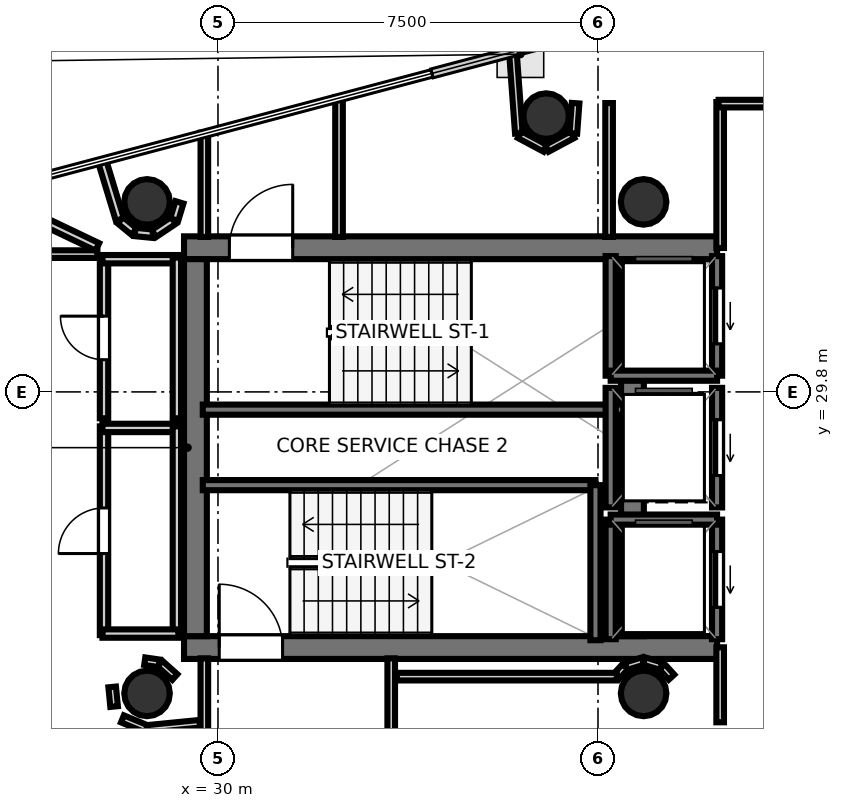
"""IFC4 building model, lengths in metres.
Left out: names, types, materials, properties, quantities, classifications, styles, units other than length and angle.
Written with IfcOpenShell. Run it as: python <this file> out.ifc"""

import sys

from ifc_helpers import new_model, si_unit, direction, frame, frame_2d, origin, origin_2d, place, context, subcontext, project, spatial, rectangle, hollow_circle, extrude, element, fill, save


model = new_model("IFC4")
c1 = context("Model", 3, precision=1e-05, world=origin(), true_north=direction((0.0, 1.0)))
c2 = subcontext(c1, "Body", "Model", "MODEL_VIEW")
j1 = project(units=[si_unit("LENGTHUNIT", "METRE"), si_unit("PLANEANGLEUNIT", "RADIAN")], contexts=[c1])
p1 = place(None, origin())
s1 = spatial("IfcSite", under=j1, at=p1, CompositionType="ELEMENT")
p2 = place(p1, origin())
s2 = spatial("IfcBuilding", under=s1, at=p2, CompositionType="ELEMENT")
p3 = place(p2, frame((0.0, 0.0, 313.9)))
s3 = spatial("IfcBuildingStorey", under=s2, at=p3, CompositionType="ELEMENT", Elevation=313.9)
p4 = place(p3, frame((29.33, 32.645, 0.0), z_axis=(0.0, 0.0, 1.0), x_axis=(1.0, 0.0, 0.0)))
e1 = element("IfcWall", 1, at=p4, inside=s3, PredefinedType="SHEAR", context=c2, shape_type="SweptSolid", body=[
    extrude(rectangle(XDim=10.52, YDim=0.45, at=frame_2d((5.26, 0.0))), origin(), (0.0, 0.0, 1.0), 3.52),
])
p5 = place(p4, frame((0.895, 0.0, 0.0)))
e2 = element("IfcOpeningElement", 2, at=p5, cuts=e1, PredefinedType="OPENING", context=c2, shape_type="SweptSolid", body=[
    extrude(rectangle(XDim=1.25, YDim=2.15, at=frame_2d((0.625, 1.075))), frame((0.0, 0.235, 0.0), z_axis=(0.0, -1.0, 0.0), x_axis=(1.0, 0.0, 0.0)), (0.0, 0.0, 1.0), 0.47),
])
p6 = place(p3, frame((29.33, 24.755, 0.0), z_axis=(0.0, 0.0, 1.0), x_axis=(1.0, 0.0, 0.0)))
e3 = element("IfcWall", 3, at=p6, inside=s3, PredefinedType="SHEAR", context=c2, shape_type="SweptSolid", body=[
    extrude(rectangle(XDim=10.52, YDim=0.45, at=frame_2d((5.26, 0.0))), origin(), (0.0, 0.0, 1.0), 3.52),
])
p7 = place(p6, frame((0.695, 0.0, 0.0)))
e4 = element("IfcOpeningElement", 4, at=p7, cuts=e3, PredefinedType="OPENING", context=c2, shape_type="SweptSolid", body=[
    extrude(rectangle(XDim=1.25, YDim=2.15, at=frame_2d((0.625, 1.075))), frame((0.0, 0.235, 0.0), z_axis=(0.0, -1.0, 0.0), x_axis=(1.0, 0.0, 0.0)), (0.0, 0.0, 1.0), 0.47),
])
for number, where, z_axis, x_axis in (
    (5, (29.555, 24.98, 0.0), (0.0, 0.0, 1.0), (0.0, 1.0, 0.0)),
    (6, (38.18, 24.98, 0.0), (0.0, 0.0, 1.0), (0.0, 1.0, 0.0)),
):
    element("IfcWall", number, at=place(p3, frame(where, z_axis=z_axis, x_axis=x_axis)), inside=s3, PredefinedType="SHEAR", context=c2, shape_type="SweptSolid", body=[
        extrude(rectangle(XDim=7.44, YDim=0.45, at=frame_2d((3.72, 0.0))), origin(), (0.0, 0.0, 1.0), 3.52),
    ])
for number, where, z_axis, x_axis in (
    (7, (28.6, 33.55, 0.0), (0.0, 0.0, 1.0), (1.0, 0.0, 0.0)),
    (8, (28.6, 23.85, 0.0), (0.0, 0.0, 1.0), (1.0, 0.0, 0.0)),
    (9, (38.4, 33.55, 0.0), (0.0, 0.0, 1.0), (1.0, 0.0, 0.0)),
    (10, (38.4, 23.85, 0.0), (0.0, 0.0, 1.0), (1.0, 0.0, 0.0)),
    (11, (36.476, 35.243, 0.0), (0.0, 0.0, 1.0), (1.0, 0.0, 0.0)),
):
    element("IfcColumn", number, at=place(p3, frame(where, z_axis=z_axis, x_axis=x_axis)), inside=s3, PredefinedType="COLUMN", context=c2, shape_type="SweptSolid", body=[
        extrude(hollow_circle(Radius=0.45, WallThickness=0.025, at=origin_2d()), origin(), (0.0, 0.0, 1.0), 3.7),
    ])
p8 = place(p3, frame((29.7, 29.45, 0.0), z_axis=(0.0, 0.0, 1.0), x_axis=(1.0, 0.0, 0.0)))
e12 = element("IfcWall", 12, at=p8, inside=s3, PredefinedType="SOLIDWALL", context=c2, shape_type="SweptSolid", body=[
    extrude(rectangle(XDim=8.3, YDim=0.2, at=frame_2d((4.15, 0.0))), origin(), (0.0, 0.0, 1.0), 3.52),
])
p9 = place(p3, frame((29.7, 27.96, 0.0), z_axis=(0.0, 0.0, 1.0), x_axis=(1.0, 0.0, 0.0)))
e13 = element("IfcWall", 13, at=p9, inside=s3, PredefinedType="SOLIDWALL", context=c2, shape_type="SweptSolid", body=[
    extrude(rectangle(XDim=7.75, YDim=0.2, at=frame_2d((3.875, 0.0))), origin(), (0.0, 0.0, 1.0), 3.52),
])
p10 = place(p3, frame((37.45, 24.9, 0.0), z_axis=(0.0, 0.0, 1.0), x_axis=(0.0, 1.0, 0.0)))
e14 = element("IfcWall", 14, at=p10, inside=s3, PredefinedType="SOLIDWALL", context=c2, shape_type="SweptSolid", body=[
    extrude(rectangle(XDim=3.06, YDim=0.2, at=frame_2d((1.53, 0.0))), origin(), (0.0, 0.0, 1.0), 3.52),
])
p11 = place(p3, frame((39.85, 30.12, 0.0), z_axis=(0.0, 0.0, 1.0), x_axis=(0.0, 1.0, 0.0)))
e15 = element("IfcWall", 15, at=p11, inside=s3, PredefinedType="SOLIDWALL", context=c2, shape_type="SweptSolid", body=[
    extrude(rectangle(XDim=2.36, YDim=0.2, at=frame_2d((1.18, 0.0))), origin(), (0.0, 0.0, 1.0), 3.52),
])
p12 = place(p11, frame((0.63, 0.0, 0.0)))
e16 = element("IfcOpeningElement", 16, at=p12, cuts=e15, PredefinedType="OPENING", context=c2, shape_type="SweptSolid", body=[
    extrude(rectangle(XDim=1.1, YDim=2.15, at=frame_2d((0.55, 1.075))), frame((0.0, 0.11, 0.0), z_axis=(0.0, -1.0, 0.0), x_axis=(1.0, 0.0, 0.0)), (0.0, 0.0, 1.0), 0.22),
])
p13 = place(p3, frame((37.75, 30.12, 0.0), z_axis=(0.0, 0.0, 1.0), x_axis=(0.0, 1.0, 0.0)))
e17 = element("IfcWall", 17, at=p13, inside=s3, PredefinedType="SOLIDWALL", context=c2, shape_type="SweptSolid", body=[
    extrude(rectangle(XDim=2.36, YDim=0.2, at=frame_2d((1.18, 0.0))), origin(), (0.0, 0.0, 1.0), 3.52),
])
p14 = place(p3, frame((37.75, 30.12, 0.0), z_axis=(0.0, 0.0, 1.0), x_axis=(1.0, 0.0, 0.0)))
e18 = element("IfcWall", 18, at=p14, inside=s3, PredefinedType="SOLIDWALL", context=c2, shape_type="SweptSolid", body=[
    extrude(rectangle(XDim=2.1, YDim=0.2, at=frame_2d((1.05, 0.0))), origin(), (0.0, 0.0, 1.0), 3.52),
])
p15 = place(p3, frame((39.85, 24.92, 0.0), z_axis=(0.0, 0.0, 1.0), x_axis=(0.0, 1.0, 0.0)))
e19 = element("IfcWall", 19, at=p15, inside=s3, PredefinedType="SOLIDWALL", context=c2, shape_type="SweptSolid", body=[
    extrude(rectangle(XDim=2.36, YDim=0.2, at=frame_2d((1.18, 0.0))), origin(), (0.0, 0.0, 1.0), 3.52),
])
p16 = place(p15, frame((0.63, 0.0, 0.0)))
e20 = element("IfcOpeningElement", 20, at=p16, cuts=e19, PredefinedType="OPENING", context=c2, shape_type="SweptSolid", body=[
    extrude(rectangle(XDim=1.1, YDim=2.15, at=frame_2d((0.55, 1.075))), frame((0.0, 0.11, 0.0), z_axis=(0.0, -1.0, 0.0), x_axis=(1.0, 0.0, 0.0)), (0.0, 0.0, 1.0), 0.22),
])
p17 = place(p3, frame((37.75, 24.92, 0.0), z_axis=(0.0, 0.0, 1.0), x_axis=(0.0, 1.0, 0.0)))
e21 = element("IfcWall", 21, at=p17, inside=s3, PredefinedType="SOLIDWALL", context=c2, shape_type="SweptSolid", body=[
    extrude(rectangle(XDim=2.36, YDim=0.2, at=frame_2d((1.18, 0.0))), origin(), (0.0, 0.0, 1.0), 3.52),
])
p18 = place(p3, frame((37.75, 27.28, 0.0), z_axis=(0.0, 0.0, 1.0), x_axis=(1.0, 0.0, 0.0)))
e22 = element("IfcWall", 22, at=p18, inside=s3, PredefinedType="SOLIDWALL", context=c2, shape_type="SweptSolid", body=[
    extrude(rectangle(XDim=2.1, YDim=0.2, at=frame_2d((1.05, 0.0))), origin(), (0.0, 0.0, 1.0), 3.52),
])
p19 = place(p3, frame((39.85, 27.52, 0.0), z_axis=(0.0, 0.0, 1.0), x_axis=(0.0, 1.0, 0.0)))
e23 = element("IfcWall", 23, at=p19, inside=s3, PredefinedType="SOLIDWALL", context=c2, shape_type="SweptSolid", body=[
    extrude(rectangle(XDim=2.36, YDim=0.2, at=frame_2d((1.18, 0.0))), origin(), (0.0, 0.0, 1.0), 3.52),
])
p20 = place(p19, frame((0.63, 0.0, 0.0)))
e24 = element("IfcOpeningElement", 24, at=p20, cuts=e23, PredefinedType="OPENING", context=c2, shape_type="SweptSolid", body=[
    extrude(rectangle(XDim=1.1, YDim=2.15, at=frame_2d((0.55, 1.075))), frame((0.0, 0.11, 0.0), z_axis=(0.0, -1.0, 0.0), x_axis=(1.0, 0.0, 0.0)), (0.0, 0.0, 1.0), 0.22),
])
p21 = place(p3, frame((37.75, 27.52, 0.0), z_axis=(0.0, 0.0, 1.0), x_axis=(0.0, 1.0, 0.0)))
e25 = element("IfcWall", 25, at=p21, inside=s3, PredefinedType="SOLIDWALL", context=c2, shape_type="SweptSolid", body=[
    extrude(rectangle(XDim=2.36, YDim=0.2, at=frame_2d((1.18, 0.0))), origin(), (0.0, 0.0, 1.0), 3.52),
])
p22 = place(p3, frame((32.389, 35.619, 0.0), z_axis=(0.0, 0.0, 1.0), x_axis=(0.0, -1.0, 0.0)))
e26 = element("IfcWall", 26, at=p22, inside=s3, PredefinedType="PARTITIONING", context=c2, shape_type="SweptSolid", body=[
    extrude(rectangle(XDim=2.761, YDim=0.15, at=frame_2d((1.381, 0.0))), origin(), (0.0, 0.0, 1.0), 2.84),
])
p23 = place(p3, frame((29.731, 32.858, 0.0), z_axis=(0.0, 0.0, 1.0), x_axis=(0.0, 1.0, 0.0)))
e27 = element("IfcWall", 27, at=p23, inside=s3, PredefinedType="PARTITIONING", context=c2, shape_type="SweptSolid", body=[
    extrude(rectangle(XDim=2.057, YDim=0.15, at=frame_2d((1.028, 0.0))), origin(), (0.0, 0.0, 1.0), 2.84),
])
for number, where, z_axis, x_axis in (
    (28, (29.731, 21.85, 0.0), (0.0, 0.0, 1.0), (0.0, 1.0, 0.0)),
    (29, (33.419, 24.542, 0.0), (0.0, 0.0, 1.0), (0.0, -1.0, 0.0)),
):
    element("IfcWall", number, at=place(p3, frame(where, z_axis=z_axis, x_axis=x_axis)), inside=s3, PredefinedType="PARTITIONING", context=c2, shape_type="SweptSolid", body=[
        extrude(rectangle(XDim=2.692, YDim=0.15, at=frame_2d((1.346, 0.0))), origin(), (0.0, 0.0, 1.0), 2.84),
    ])
p24 = place(p3, frame((39.911, 23.28, 0.0), z_axis=(0.0, 0.0, 1.0), x_axis=(0.0, 1.0, 0.0)))
e30 = element("IfcWall", 30, at=p24, inside=s3, PredefinedType="PARTITIONING", context=c2, shape_type="SweptSolid", body=[
    extrude(rectangle(XDim=1.48, YDim=0.15, at=frame_2d((0.74, 0.0))), origin(), (0.0, 0.0, 1.0), 2.84),
])
p25 = place(p3, frame((39.911, 32.64, 0.0), z_axis=(0.0, 0.0, 1.0), x_axis=(0.0, 1.0, 0.0)))
e31 = element("IfcWall", 31, at=p25, inside=s3, PredefinedType="PARTITIONING", context=c2, shape_type="SweptSolid", body=[
    extrude(rectangle(XDim=2.88, YDim=0.15, at=frame_2d((1.44, 0.0))), origin(), (0.0, 0.0, 1.0), 2.84),
])
p26 = place(p3, frame((39.88, 35.489, 0.0), z_axis=(0.0, 0.0, 1.0), x_axis=(1.0, 0.0, 0.0)))
e32 = element("IfcWall", 32, at=p26, inside=s3, PredefinedType="PARTITIONING", context=c2, shape_type="SweptSolid", body=[
    extrude(rectangle(XDim=1.48, YDim=0.15, at=frame_2d((0.74, 0.0))), origin(), (0.0, 0.0, 1.0), 2.84),
])
p27 = place(p3, frame((27.751, 25.0, 0.0), z_axis=(0.0, 0.0, 1.0), x_axis=(0.0, 1.0, 0.0)))
e33 = element("IfcWall", 33, at=p27, inside=s3, PredefinedType="PLUMBINGWALL", context=c2, shape_type="SweptSolid", body=[
    extrude(rectangle(XDim=4.12, YDim=0.165, at=frame_2d((2.06, 0.0))), origin(), (0.0, 0.0, 1.0), 2.84),
])
p28 = place(p27, frame((1.61, 0.0, 0.0)))
e34 = element("IfcOpeningElement", 34, at=p28, cuts=e33, PredefinedType="OPENING", context=c2, shape_type="SweptSolid", body=[
    extrude(rectangle(XDim=0.9, YDim=2.1, at=frame_2d((0.45, 1.05))), frame((0.0, 0.093, 0.0), z_axis=(0.0, -1.0, 0.0), x_axis=(1.0, 0.0, 0.0)), (0.0, 0.0, 1.0), 0.185),
])
p29 = place(p3, frame((27.72, 29.089, 0.0), z_axis=(0.0, 0.0, 1.0), x_axis=(1.0, 0.0, 0.0)))
e35 = element("IfcWall", 35, at=p29, inside=s3, PredefinedType="PLUMBINGWALL", context=c2, shape_type="SweptSolid", body=[
    extrude(rectangle(XDim=1.5, YDim=0.165, at=frame_2d((0.75, 0.0))), origin(), (0.0, 0.0, 1.0), 2.84),
])
p30 = place(p3, frame((29.189, 29.12, 0.0), z_axis=(0.0, 0.0, 1.0), x_axis=(0.0, -1.0, 0.0)))
e36 = element("IfcWall", 36, at=p30, inside=s3, PredefinedType="PLUMBINGWALL", context=c2, shape_type="SweptSolid", body=[
    extrude(rectangle(XDim=4.12, YDim=0.165, at=frame_2d((2.06, 0.0))), origin(), (0.0, 0.0, 1.0), 2.84),
])
p31 = place(p3, frame((29.22, 25.031, 0.0), z_axis=(0.0, 0.0, 1.0), x_axis=(-1.0, 0.0, 0.0)))
e37 = element("IfcWall", 37, at=p31, inside=s3, PredefinedType="PLUMBINGWALL", context=c2, shape_type="SweptSolid", body=[
    extrude(rectangle(XDim=1.5, YDim=0.165, at=frame_2d((0.75, 0.0))), origin(), (0.0, 0.0, 1.0), 2.84),
])
p32 = place(p3, frame((27.751, 29.28, 0.0), z_axis=(0.0, 0.0, 1.0), x_axis=(0.0, 1.0, 0.0)))
e38 = element("IfcWall", 38, at=p32, inside=s3, PredefinedType="PLUMBINGWALL", context=c2, shape_type="SweptSolid", body=[
    extrude(rectangle(XDim=3.17, YDim=0.165, at=frame_2d((1.585, 0.0))), origin(), (0.0, 0.0, 1.0), 2.84),
])
p33 = place(p32, frame((1.155, 0.0, 0.0)))
e39 = element("IfcOpeningElement", 39, at=p33, cuts=e38, PredefinedType="OPENING", context=c2, shape_type="SweptSolid", body=[
    extrude(rectangle(XDim=0.86, YDim=2.05, at=frame_2d((0.43, 1.025))), frame((0.0, 0.093, 0.0), z_axis=(0.0, -1.0, 0.0), x_axis=(1.0, 0.0, 0.0)), (0.0, 0.0, 1.0), 0.185),
])
p34 = place(p3, frame((27.72, 32.419, 0.0), z_axis=(0.0, 0.0, 1.0), x_axis=(1.0, 0.0, 0.0)))
e40 = element("IfcWall", 40, at=p34, inside=s3, PredefinedType="PLUMBINGWALL", context=c2, shape_type="SweptSolid", body=[
    extrude(rectangle(XDim=1.5, YDim=0.165, at=frame_2d((0.75, 0.0))), origin(), (0.0, 0.0, 1.0), 2.84),
])
p35 = place(p3, frame((29.189, 32.45, 0.0), z_axis=(0.0, 0.0, 1.0), x_axis=(0.0, -1.0, 0.0)))
e41 = element("IfcWall", 41, at=p35, inside=s3, PredefinedType="PLUMBINGWALL", context=c2, shape_type="SweptSolid", body=[
    extrude(rectangle(XDim=3.17, YDim=0.165, at=frame_2d((1.585, 0.0))), origin(), (0.0, 0.0, 1.0), 2.84),
])
p36 = place(p3, frame((38.951, 24.171, 0.0), z_axis=(0.0, 0.0, 1.0), x_axis=(-0.674186852077, 0.738560822469, 0.0)))
e42 = element("IfcWall", 42, at=p36, inside=s3, PredefinedType="PARTITIONING", context=c2, shape_type="SweptSolid", body=[
    extrude(rectangle(XDim=0.281, YDim=0.15, at=frame_2d((0.14, 0.0))), origin(), (0.0, 0.0, 1.0), 2.84),
])
p37 = place(p3, frame((38.748, 24.387, 0.0), z_axis=(0.0, 0.0, 1.0), x_axis=(-0.956948991291, 0.290256142171, 0.0)))
e43 = element("IfcWall", 43, at=p37, inside=s3, PredefinedType="PARTITIONING", context=c2, shape_type="SweptSolid", body=[
    extrude(rectangle(XDim=0.354, YDim=0.15, at=frame_2d((0.177, 0.0))), origin(), (0.0, 0.0, 1.0), 2.84),
])
p38 = place(p3, frame((38.391, 24.49, 0.0), z_axis=(0.0, 0.0, 1.0), x_axis=(-0.957007018611, -0.290064762301, 0.0)))
e44 = element("IfcWall", 44, at=p38, inside=s3, PredefinedType="PARTITIONING", context=c2, shape_type="SweptSolid", body=[
    extrude(rectangle(XDim=0.354, YDim=0.15, at=frame_2d((0.177, 0.0))), origin(), (0.0, 0.0, 1.0), 2.84),
])
p39 = place(p3, frame((38.038, 24.378, 0.0), z_axis=(0.0, 0.0, 1.0), x_axis=(-0.673658387955, -0.739042878551, 0.0)))
e45 = element("IfcWall", 45, at=p39, inside=s3, PredefinedType="PARTITIONING", context=c2, shape_type="SweptSolid", body=[
    extrude(rectangle(XDim=0.246, YDim=0.15, at=frame_2d((0.123, 0.0))), origin(), (0.0, 0.0, 1.0), 2.84),
])
p40 = place(p3, frame((37.872, 24.181, 0.0), z_axis=(0.0, 0.0, 1.0), x_axis=(-1.0, 0.0, 0.0)))
e46 = element("IfcWall", 46, at=p40, inside=s3, PredefinedType="PARTITIONING", context=c2, shape_type="SweptSolid", body=[
    extrude(rectangle(XDim=4.342, YDim=0.15, at=frame_2d((2.171, 0.0))), origin(), (0.0, 0.0, 1.0), 2.84),
])
p41 = place(p3, frame((29.149, 24.173, 0.0), z_axis=(0.0, 0.0, 1.0), x_axis=(-0.745225165416, 0.666812906917, 0.0)))
e47 = element("IfcWall", 47, at=p41, inside=s3, PredefinedType="PARTITIONING", context=c2, shape_type="SweptSolid", body=[
    extrude(rectangle(XDim=0.396, YDim=0.15, at=frame_2d((0.198, 0.0))), origin(), (0.0, 0.0, 1.0), 2.84),
])
p42 = place(p3, frame((28.838, 24.444, 0.0), z_axis=(0.0, 0.0, 1.0), x_axis=(-0.989449148305, 0.144880581578, 0.0)))
e48 = element("IfcWall", 48, at=p42, inside=s3, PredefinedType="PARTITIONING", context=c2, shape_type="SweptSolid", body=[
    extrude(rectangle(XDim=0.286, YDim=0.15, at=frame_2d((0.143, 0.0))), origin(), (0.0, 0.0, 1.0), 2.84),
])
p43 = place(p3, frame((35.818, 36.529, 0.0), z_axis=(0.0, 0.0, 1.0), x_axis=(0.073342389609, -0.997306820335, 0.0)))
e49 = element("IfcWall", 49, at=p43, inside=s3, PredefinedType="PARTITIONING", context=c2, shape_type="SweptSolid", body=[
    extrude(rectangle(XDim=1.631, YDim=0.15, at=frame_2d((0.815, 0.0))), origin(), (0.0, 0.0, 1.0), 2.84),
])
for number, where, z_axis, x_axis in (
    (50, (35.954, 34.877, 0.0), (0.0, 0.0, 1.0), (0.882, -0.471, 0.0)),
    (51, (36.49, 34.606, 0.0), (0.0, 0.0, 1.0), (0.882, 0.471, 0.0)),
):
    element("IfcWall", number, at=place(p3, frame(where, z_axis=z_axis, x_axis=x_axis)), inside=s3, PredefinedType="PARTITIONING", context=c2, shape_type="SweptSolid", body=[
        extrude(rectangle(XDim=0.575, YDim=0.15, at=frame_2d((0.288, 0.0))), origin(), (0.0, 0.0, 1.0), 2.84),
    ])
p44 = place(p3, frame((37.014, 34.902, 0.0), z_axis=(0.0, 0.0, 1.0), x_axis=(0.073134230676, 0.997322106595, 0.0)))
e52 = element("IfcWall", 52, at=p44, inside=s3, PredefinedType="PARTITIONING", context=c2, shape_type="SweptSolid", body=[
    extrude(rectangle(XDim=0.598, YDim=0.15, at=frame_2d((0.299, 0.0))), origin(), (0.0, 0.0, 1.0), 2.84),
])
p45 = place(p3, frame((37.719, 35.5, 0.0), z_axis=(0.0, 0.0, 1.0), x_axis=(0.0, -1.0, 0.0)))
e53 = element("IfcWall", 53, at=p45, inside=s3, PredefinedType="PARTITIONING", context=c2, shape_type="SweptSolid", body=[
    extrude(rectangle(XDim=2.642, YDim=0.15, at=frame_2d((1.321, 0.0))), origin(), (0.0, 0.0, 1.0), 2.84),
])
p46 = place(p3, frame((25.65, 32.519, 0.0), z_axis=(0.0, 0.0, 1.0), x_axis=(1.0, 0.0, 0.0)))
e54 = element("IfcWall", 54, at=p46, inside=s3, PredefinedType="PARTITIONING", context=c2, shape_type="SweptSolid", body=[
    extrude(rectangle(XDim=1.97, YDim=0.15, at=frame_2d((0.985, 0.0))), origin(), (0.0, 0.0, 1.0), 2.84),
])
p47 = place(p3, frame((27.912, 23.978, 0.0), z_axis=(0.0, 0.0, 1.0), x_axis=(0.097888269922, -0.995197410875, 0.0)))
e55 = element("IfcWall", 55, at=p47, inside=s3, PredefinedType="PARTITIONING", context=c2, shape_type="SweptSolid", body=[
    extrude(rectangle(XDim=0.389, YDim=0.15, at=frame_2d((0.195, 0.0))), origin(), (0.0, 0.0, 1.0), 2.84),
])
p48 = place(p3, frame((28.115, 23.348, 0.0), z_axis=(0.0, 0.0, 1.0), x_axis=(0.923807847969, -0.382856448334, 0.0)))
e56 = element("IfcWall", 56, at=p48, inside=s3, PredefinedType="PARTITIONING", context=c2, shape_type="SweptSolid", body=[
    extrude(rectangle(XDim=0.513, YDim=0.15, at=frame_2d((0.256, 0.0))), origin(), (0.0, 0.0, 1.0), 2.84),
])
p49 = place(p3, frame((28.603, 23.149, 0.0), z_axis=(0.0, 0.0, 1.0), x_axis=(0.995179827095, 0.098066873836, 0.0)))
e57 = element("IfcWall", 57, at=p49, inside=s3, PredefinedType="PARTITIONING", context=c2, shape_type="SweptSolid", body=[
    extrude(rectangle(XDim=1.043, YDim=0.15, at=frame_2d((0.521, 0.0))), origin(), (0.0, 0.0, 1.0), 2.84),
])
p50 = place(p3, frame((54.906, 38.4, 0.0), z_axis=(0.0, 0.0, 1.0), x_axis=(-0.445365926059, -0.895348642656, 0.0)))
e58 = element("IfcWall", 58, at=p50, inside=s3, PredefinedType="PARTITIONING", context=c2, shape_type="SweptSolid", body=[
    extrude(rectangle(XDim=34.796, YDim=0.105, at=frame_2d((17.398, 0.0))), origin(), (0.0, 0.0, 1.0), 2.84),
])
p51 = place(p3, frame((27.62, 32.661, 0.0), z_axis=(0.0, 0.0, 1.0), x_axis=(-0.902520737302, 0.430646396409, 0.0)))
e59 = element("IfcWall", 59, at=p51, inside=s3, PredefinedType="PLUMBINGWALL", context=c2, shape_type="SweptSolid", body=[
    extrude(rectangle(XDim=2.499, YDim=0.165, at=frame_2d((1.25, 0.0))), origin(), (0.0, 0.0, 1.0), 2.84),
])
p52 = place(p3, frame((27.706, 34.378, 0.0), z_axis=(0.0, 0.0, 1.0), x_axis=(0.29018930869, -0.956969260281, 0.0)))
e60 = element("IfcWall", 60, at=p52, inside=s3, PredefinedType="PLUMBINGWALL", context=c2, shape_type="SweptSolid", body=[
    extrude(rectangle(XDim=1.229, YDim=0.165, at=frame_2d((0.615, 0.0))), origin(), (0.0, 0.0, 1.0), 2.84),
])
for number, where, z_axis, x_axis in (
    (61, (28.073, 33.187, 0.0), (0.0, 0.0, 1.0), (0.773, -0.634, 0.0)),
    (62, (28.364, 32.956, 0.0), (0.0, 0.0, 1.0), (0.995, -0.098, 0.0)),
):
    element("IfcWall", number, at=place(p3, frame(where, z_axis=z_axis, x_axis=x_axis)), inside=s3, PredefinedType="PLUMBINGWALL", context=c2, shape_type="SweptSolid", body=[
        extrude(rectangle(XDim=0.354, YDim=0.165, at=frame_2d((0.177, 0.0))), origin(), (0.0, 0.0, 1.0), 2.84),
    ])
p53 = place(p3, frame((28.736, 32.926, 0.0), z_axis=(0.0, 0.0, 1.0), x_axis=(0.831487045435, 0.555544141607, 0.0)))
e63 = element("IfcWall", 63, at=p53, inside=s3, PredefinedType="PLUMBINGWALL", context=c2, shape_type="SweptSolid", body=[
    extrude(rectangle(XDim=0.467, YDim=0.165, at=frame_2d((0.233, 0.0))), origin(), (0.0, 0.0, 1.0), 2.84),
])
p54 = place(p3, frame((29.137, 33.202, 0.0), z_axis=(0.0, 0.0, 1.0), x_axis=(0.290256142171, 0.956948991291, 0.0)))
e64 = element("IfcWall", 64, at=p54, inside=s3, PredefinedType="PLUMBINGWALL", context=c2, shape_type="SweptSolid", body=[
    extrude(rectangle(XDim=0.354, YDim=0.165, at=frame_2d((0.177, 0.0))), origin(), (0.0, 0.0, 1.0), 2.84),
])
p55 = place(p5, origin())
e65 = element("IfcDoor", 65, at=p55, inside=s3, OperationType="SINGLE_SWING_RIGHT", PredefinedType="DOOR", context=c2, shape_type="SweptSolid", body=[
    extrude(rectangle(XDim=1.25, YDim=2.15, at=frame_2d((0.625, 1.075))), frame((0.0, 0.025, 0.0), z_axis=(0.0, -1.0, 0.0), x_axis=(1.0, 0.0, 0.0)), (0.0, 0.0, 1.0), 0.05),
])
fill(e2, e65)
p56 = place(p7, origin())
e66 = element("IfcDoor", 66, at=p56, inside=s3, OperationType="SINGLE_SWING_LEFT", PredefinedType="DOOR", context=c2, shape_type="SweptSolid", body=[
    extrude(rectangle(XDim=1.25, YDim=2.15, at=frame_2d((0.625, 1.075))), frame((0.0, 0.025, 0.0), z_axis=(0.0, -1.0, 0.0), x_axis=(1.0, 0.0, 0.0)), (0.0, 0.0, 1.0), 0.05),
])
fill(e4, e66)
p57 = place(p12, origin())
e67 = element("IfcDoor", 67, at=p57, inside=s3, OperationType="SLIDING_TO_LEFT", PredefinedType="DOOR", context=c2, shape_type="SweptSolid", body=[
    extrude(rectangle(XDim=1.1, YDim=2.15, at=frame_2d((0.55, 1.075))), frame((0.0, 0.025, 0.0), z_axis=(0.0, -1.0, 0.0), x_axis=(1.0, 0.0, 0.0)), (0.0, 0.0, 1.0), 0.05),
])
fill(e16, e67)
p58 = place(p16, origin())
e68 = element("IfcDoor", 68, at=p58, inside=s3, OperationType="SLIDING_TO_LEFT", PredefinedType="DOOR", context=c2, shape_type="SweptSolid", body=[
    extrude(rectangle(XDim=1.1, YDim=2.15, at=frame_2d((0.55, 1.075))), frame((0.0, 0.025, 0.0), z_axis=(0.0, -1.0, 0.0), x_axis=(1.0, 0.0, 0.0)), (0.0, 0.0, 1.0), 0.05),
])
fill(e20, e68)
p59 = place(p20, origin())
e69 = element("IfcDoor", 69, at=p59, inside=s3, OperationType="SLIDING_TO_LEFT", PredefinedType="DOOR", context=c2, shape_type="SweptSolid", body=[
    extrude(rectangle(XDim=1.1, YDim=2.15, at=frame_2d((0.55, 1.075))), frame((0.0, 0.025, 0.0), z_axis=(0.0, -1.0, 0.0), x_axis=(1.0, 0.0, 0.0)), (0.0, 0.0, 1.0), 0.05),
])
fill(e24, e69)
p60 = place(p28, origin())
e70 = element("IfcDoor", 70, at=p60, inside=s3, OperationType="SINGLE_SWING_LEFT", PredefinedType="DOOR", context=c2, shape_type="SweptSolid", body=[
    extrude(rectangle(XDim=0.9, YDim=2.1, at=frame_2d((0.45, 1.05))), frame((0.0, 0.025, 0.0), z_axis=(0.0, -1.0, 0.0), x_axis=(1.0, 0.0, 0.0)), (0.0, 0.0, 1.0), 0.05),
])
fill(e34, e70)
p61 = place(p33, origin())
e71 = element("IfcDoor", 71, at=p61, inside=s3, OperationType="SINGLE_SWING_RIGHT", PredefinedType="DOOR", context=c2, shape_type="SweptSolid", body=[
    extrude(rectangle(XDim=0.86, YDim=2.05, at=frame_2d((0.43, 1.025))), frame((0.0, 0.025, 0.0), z_axis=(0.0, -1.0, 0.0), x_axis=(1.0, 0.0, 0.0)), (0.0, 0.0, 1.0), 0.05),
])
fill(e39, e71)
save(model, sys.argv[1])
